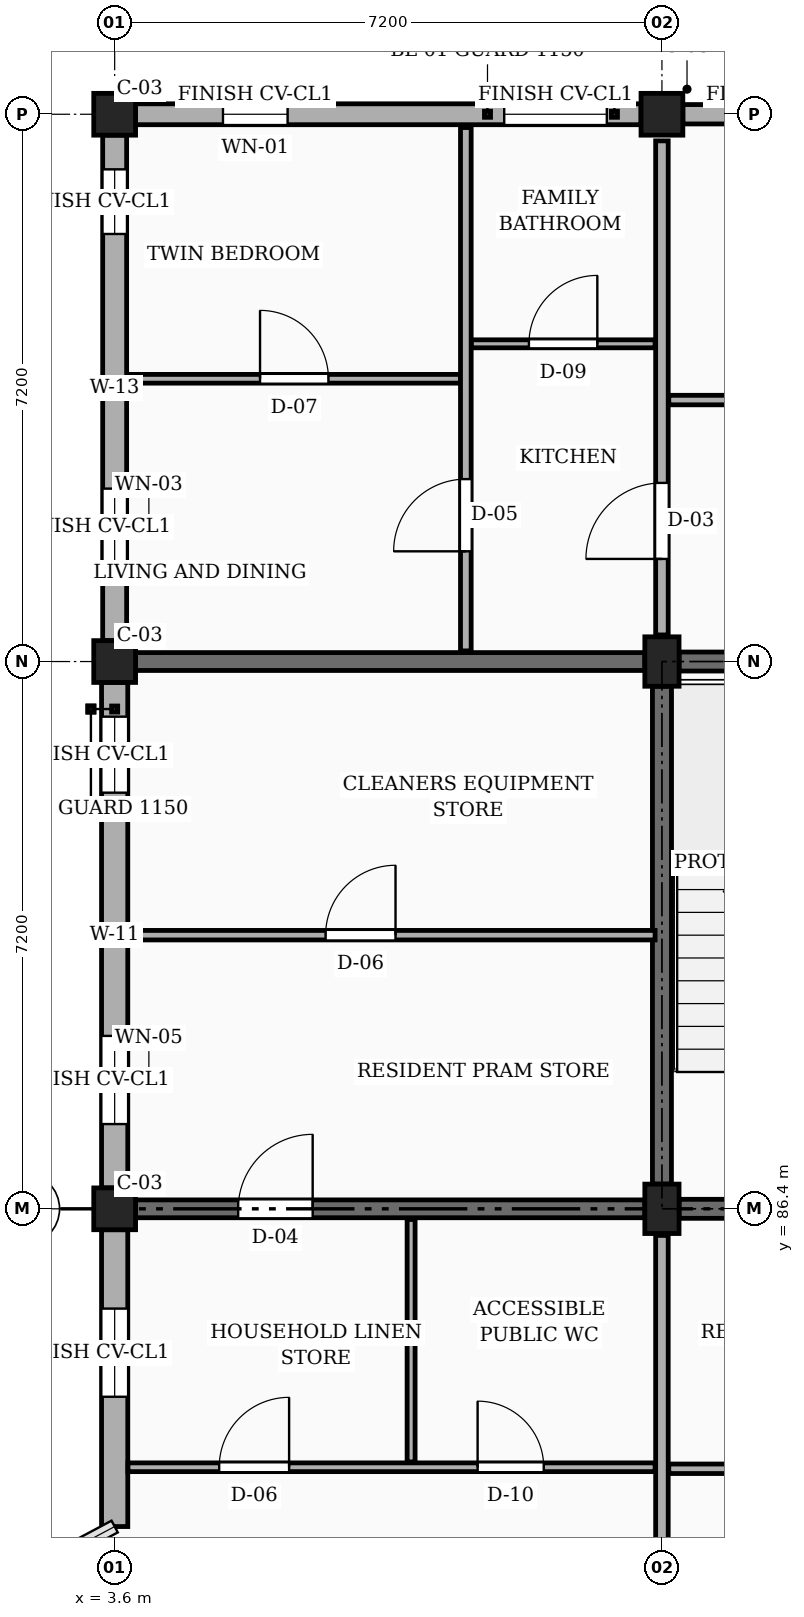
"""IFC4 building model, lengths in metres.
Left out: names, types, materials, properties, quantities, classifications, styles, units other than length and angle.
Written with IfcOpenShell. Run it as: python <this file> out.ifc"""

import sys

from ifc_helpers import new_model, si_unit, direction, frame, frame_2d, origin, origin_2d, place, context, subcontext, project, spatial, rectangle, extrude, element, fill, save


model = new_model("IFC4")
c1 = context("Model", 3, precision=1e-05, world=origin(), true_north=direction((0.0, 1.0)))
c2 = subcontext(c1, "Body", "Model", "MODEL_VIEW")
j1 = project(units=[si_unit("LENGTHUNIT", "METRE"), si_unit("PLANEANGLEUNIT", "RADIAN")], contexts=[c1])
p1 = place(None, origin())
s1 = spatial("IfcSite", under=j1, at=p1, CompositionType="ELEMENT")
p2 = place(p1, origin())
s2 = spatial("IfcBuilding", under=s1, at=p2, CompositionType="ELEMENT")
p3 = place(p2, frame((0.0, 0.0, 13.95)))
s3 = spatial("IfcBuildingStorey", under=s2, at=p3, CompositionType="ELEMENT", Elevation=13.95)
for number, where, z_axis, x_axis in (
    (1, (3.6, 86.4, 0.0), (0.0, 0.0, 1.0), (1.0, 0.0, 0.0)),
    (2, (3.6, 93.6, 0.0), (0.0, 0.0, 1.0), (1.0, 0.0, 0.0)),
    (3, (3.6, 100.8, 0.0), (0.0, 0.0, 1.0), (1.0, 0.0, 0.0)),
):
    element("IfcColumn", number, at=place(p3, frame(where, z_axis=z_axis, x_axis=x_axis)), inside=s3, PredefinedType="COLUMN", context=c2, shape_type="SweptSolid", body=[
        extrude(rectangle(XDim=0.55, YDim=0.55, at=origin_2d()), origin(), (0.0, 0.0, 1.0), 3.15),
    ])
for number, where, z_axis, x_axis in (
    (4, (10.8, 86.4, 0.0), (0.0, 0.0, 1.0), (1.0, 0.0, 0.0)),
    (5, (10.8, 93.6, 0.0), (0.0, 0.0, 1.0), (1.0, 0.0, 0.0)),
):
    element("IfcColumn", number, at=place(p3, frame(where, z_axis=z_axis, x_axis=x_axis)), inside=s3, PredefinedType="COLUMN", context=c2, shape_type="SweptSolid", body=[
        extrude(rectangle(XDim=0.45, YDim=0.65, at=origin_2d()), origin(), (0.0, 0.0, 1.0), 3.15),
    ])
p4 = place(p3, frame((10.8, 100.8, 0.0), z_axis=(0.0, 0.0, 1.0), x_axis=(1.0, 0.0, 0.0)))
e6 = element("IfcColumn", 6, at=p4, inside=s3, PredefinedType="COLUMN", context=c2, shape_type="SweptSolid", body=[
    extrude(rectangle(XDim=0.55, YDim=0.55, at=origin_2d()), origin(), (0.0, 0.0, 1.0), 3.15),
])
p5 = place(p3, frame((3.875, 86.4, 0.0), z_axis=(0.0, 0.0, 1.0), x_axis=(1.0, 0.0, 0.0)))
e7 = element("IfcWall", 7, at=p5, inside=s3, PredefinedType="SOLIDWALL", context=c2, shape_type="SweptSolid", body=[
    extrude(rectangle(XDim=6.7, YDim=0.235, at=frame_2d((3.35, 0.0))), origin(), (0.0, 0.0, 1.0), 2.21),
])
p6 = place(p5, frame((1.35, 0.0, 0.0)))
e8 = element("IfcOpeningElement", 8, at=p6, cuts=e7, PredefinedType="OPENING", context=c2, shape_type="SweptSolid", body=[
    extrude(rectangle(XDim=0.98, YDim=2.12, at=frame_2d((0.49, 1.06))), frame((0.0, 0.127, 0.0), z_axis=(0.0, -1.0, 0.0), x_axis=(1.0, 0.0, 0.0)), (0.0, 0.0, 1.0), 0.255),
])
p7 = place(p3, frame((3.875, 93.6, 0.0), z_axis=(0.0, 0.0, 1.0), x_axis=(1.0, 0.0, 0.0)))
e9 = element("IfcWall", 9, at=p7, inside=s3, PredefinedType="SOLIDWALL", context=c2, shape_type="SweptSolid", body=[
    extrude(rectangle(XDim=6.7, YDim=0.235, at=frame_2d((3.35, 0.0))), origin(), (0.0, 0.0, 1.0), 2.21),
])
p8 = place(p3, frame((17.725, 100.8, 0.0), z_axis=(0.0, 0.0, 1.0), x_axis=(-1.0, 0.0, 0.0)))
e10 = element("IfcWall", 10, at=p8, inside=s3, PredefinedType="SOLIDWALL", context=c2, shape_type="SweptSolid", body=[
    extrude(rectangle(XDim=6.65, YDim=0.255, at=frame_2d((3.325, 0.0))), origin(), (0.0, 0.0, 1.0), 2.48),
])
p9 = place(p8, frame((0.45, 0.0, 0.78)))
e11 = element("IfcOpeningElement", 11, at=p9, cuts=e10, PredefinedType="OPENING", context=c2, shape_type="SweptSolid", body=[
    extrude(rectangle(XDim=1.15, YDim=1.44, at=frame_2d((0.575, 0.72))), frame((0.0, 0.137, 0.0), z_axis=(0.0, -1.0, 0.0), x_axis=(1.0, 0.0, 0.0)), (0.0, 0.0, 1.0), 0.275),
])
p10 = place(p8, frame((4.65, 0.0, 0.78)))
e12 = element("IfcOpeningElement", 12, at=p10, cuts=e10, PredefinedType="OPENING", context=c2, shape_type="SweptSolid", body=[
    extrude(rectangle(XDim=1.35, YDim=1.44, at=frame_2d((0.675, 0.72))), frame((0.0, 0.137, 0.0), z_axis=(0.0, -1.0, 0.0), x_axis=(1.0, 0.0, 0.0)), (0.0, 0.0, 1.0), 0.275),
])
p11 = place(p3, frame((10.525, 100.8, 0.0), z_axis=(0.0, 0.0, 1.0), x_axis=(-1.0, 0.0, 0.0)))
e13 = element("IfcWall", 13, at=p11, inside=s3, PredefinedType="SOLIDWALL", context=c2, shape_type="SweptSolid", body=[
    extrude(rectangle(XDim=6.65, YDim=0.275, at=frame_2d((3.325, 0.0))), origin(), (0.0, 0.0, 1.0), 2.48),
])
p12 = place(p11, frame((0.45, 0.0, 0.78)))
e14 = element("IfcOpeningElement", 14, at=p12, cuts=e13, PredefinedType="OPENING", context=c2, shape_type="SweptSolid", body=[
    extrude(rectangle(XDim=1.35, YDim=1.44, at=frame_2d((0.675, 0.72))), frame((0.0, 0.147, 0.0), z_axis=(0.0, -1.0, 0.0), x_axis=(1.0, 0.0, 0.0)), (0.0, 0.0, 1.0), 0.295),
])
p13 = place(p11, frame((4.65, 0.0, 0.78)))
e15 = element("IfcOpeningElement", 15, at=p13, cuts=e13, PredefinedType="OPENING", context=c2, shape_type="SweptSolid", body=[
    extrude(rectangle(XDim=0.85, YDim=1.15, at=frame_2d((0.425, 0.575))), frame((0.0, 0.147, 0.0), z_axis=(0.0, -1.0, 0.0), x_axis=(1.0, 0.0, 0.0)), (0.0, 0.0, 1.0), 0.295),
])
p14 = place(p3, frame((3.6, 100.525, 0.0), z_axis=(0.0, 0.0, 1.0), x_axis=(0.0, -1.0, 0.0)))
e16 = element("IfcWall", 16, at=p14, inside=s3, PredefinedType="SOLIDWALL", context=c2, shape_type="SweptSolid", body=[
    extrude(rectangle(XDim=6.65, YDim=0.315, at=frame_2d((3.325, 0.0))), origin(), (0.0, 0.0, 1.0), 2.48),
])
p15 = place(p14, frame((0.45, 0.0, 0.78)))
e17 = element("IfcOpeningElement", 17, at=p15, cuts=e16, PredefinedType="OPENING", context=c2, shape_type="SweptSolid", body=[
    extrude(rectangle(XDim=0.85, YDim=1.15, at=frame_2d((0.425, 0.575))), frame((0.0, 0.167, 0.0), z_axis=(0.0, -1.0, 0.0), x_axis=(1.0, 0.0, 0.0)), (0.0, 0.0, 1.0), 0.335),
])
p16 = place(p14, frame((4.65, 0.0, 0.78)))
e18 = element("IfcOpeningElement", 18, at=p16, cuts=e16, PredefinedType="OPENING", context=c2, shape_type="SweptSolid", body=[
    extrude(rectangle(XDim=1.0, YDim=1.15, at=frame_2d((0.5, 0.575))), frame((0.0, 0.167, 0.0), z_axis=(0.0, -1.0, 0.0), x_axis=(1.0, 0.0, 0.0)), (0.0, 0.0, 1.0), 0.335),
])
p17 = place(p3, frame((3.6, 93.325, 0.0), z_axis=(0.0, 0.0, 1.0), x_axis=(0.0, -1.0, 0.0)))
e19 = element("IfcWall", 19, at=p17, inside=s3, PredefinedType="SOLIDWALL", context=c2, shape_type="SweptSolid", body=[
    extrude(rectangle(XDim=6.65, YDim=0.345, at=frame_2d((3.325, 0.0))), origin(), (0.0, 0.0, 1.0), 2.48),
])
p18 = place(p17, frame((0.45, 0.0, 0.78)))
e20 = element("IfcOpeningElement", 20, at=p18, cuts=e19, PredefinedType="OPENING", context=c2, shape_type="SweptSolid", body=[
    extrude(rectangle(XDim=1.0, YDim=1.15, at=frame_2d((0.5, 0.575))), frame((0.0, 0.183, 0.0), z_axis=(0.0, -1.0, 0.0), x_axis=(1.0, 0.0, 0.0)), (0.0, 0.0, 1.0), 0.365),
])
p19 = place(p17, frame((4.65, 0.0, 0.78)))
e21 = element("IfcOpeningElement", 21, at=p19, cuts=e19, PredefinedType="OPENING", context=c2, shape_type="SweptSolid", body=[
    extrude(rectangle(XDim=1.16, YDim=1.15, at=frame_2d((0.58, 0.575))), frame((0.0, 0.183, 0.0), z_axis=(0.0, -1.0, 0.0), x_axis=(1.0, 0.0, 0.0)), (0.0, 0.0, 1.0), 0.365),
])
p20 = place(p3, frame((3.6, 86.125, 0.0), z_axis=(0.0, 0.0, 1.0), x_axis=(0.0, -1.0, 0.0)))
e22 = element("IfcWall", 22, at=p20, inside=s3, PredefinedType="SOLIDWALL", context=c2, shape_type="SweptSolid", body=[
    extrude(rectangle(XDim=3.905, YDim=0.345, at=frame_2d((1.953, 0.0))), origin(), (0.0, 0.0, 1.0), 2.48),
])
p21 = place(p20, frame((1.038, 0.0, 0.78)))
e23 = element("IfcOpeningElement", 23, at=p21, cuts=e22, PredefinedType="OPENING", context=c2, shape_type="SweptSolid", body=[
    extrude(rectangle(XDim=1.16, YDim=1.15, at=frame_2d((0.58, 0.575))), frame((0.0, 0.183, 0.0), z_axis=(0.0, -1.0, 0.0), x_axis=(1.0, 0.0, 0.0)), (0.0, 0.0, 1.0), 0.365),
])
p22 = place(p3, frame((10.8, 86.725, 0.0), z_axis=(0.0, 0.0, 1.0), x_axis=(0.0, 1.0, 0.0)))
e24 = element("IfcWall", 24, at=p22, inside=s3, PredefinedType="SHEAR", context=c2, shape_type="SweptSolid", body=[
    extrude(rectangle(XDim=6.55, YDim=0.25, at=frame_2d((3.275, 0.0))), origin(), (0.0, 0.0, 1.0), 2.91),
])
for number, where, z_axis, x_axis in (
    (25, (11.025, 93.6, 0.0), (0.0, 0.0, 1.0), (1.0, 0.0, 0.0)),
    (26, (11.025, 86.4, 0.0), (0.0, 0.0, 1.0), (1.0, 0.0, 0.0)),
):
    element("IfcWall", number, at=place(p3, frame(where, z_axis=z_axis, x_axis=x_axis)), inside=s3, PredefinedType="SHEAR", context=c2, shape_type="SweptSolid", body=[
        extrude(rectangle(XDim=6.75, YDim=0.25, at=frame_2d((3.375, 0.0))), origin(), (0.0, 0.0, 1.0), 2.91),
    ])
p23 = place(p3, frame((10.8, 79.55, 0.0), z_axis=(0.0, 0.0, 1.0), x_axis=(0.0, 1.0, 0.0)))
e27 = element("IfcWall", 27, at=p23, inside=s3, PredefinedType="PARTITIONING", context=c2, shape_type="SweptSolid", body=[
    extrude(rectangle(XDim=6.5, YDim=0.165, at=frame_2d((3.25, 0.0))), origin(), (0.0, 0.0, 1.0), 2.345),
])
p24 = place(p23, frame((1.1, 0.0, 0.0)))
e28 = element("IfcOpeningElement", 28, at=p24, cuts=e27, PredefinedType="OPENING", context=c2, shape_type="SweptSolid", body=[
    extrude(rectangle(XDim=1.14, YDim=2.18, at=frame_2d((0.57, 1.09))), frame((0.0, 0.093, 0.0), z_axis=(0.0, -1.0, 0.0), x_axis=(1.0, 0.0, 0.0)), (0.0, 0.0, 1.0), 0.185),
])
p25 = place(p3, frame((10.8, 93.95, 0.0), z_axis=(0.0, 0.0, 1.0), x_axis=(0.0, 1.0, 0.0)))
e29 = element("IfcWall", 29, at=p25, inside=s3, PredefinedType="PARTITIONING", context=c2, shape_type="SweptSolid", body=[
    extrude(rectangle(XDim=6.5, YDim=0.165, at=frame_2d((3.25, 0.0))), origin(), (0.0, 0.0, 1.0), 2.345),
])
p26 = place(p25, frame((1.0, 0.0, 0.0)))
e30 = element("IfcOpeningElement", 30, at=p26, cuts=e29, PredefinedType="OPENING", context=c2, shape_type="SweptSolid", body=[
    extrude(rectangle(XDim=1.0, YDim=2.15, at=frame_2d((0.5, 1.075))), frame((0.0, 0.093, 0.0), z_axis=(0.0, -1.0, 0.0), x_axis=(1.0, 0.0, 0.0)), (0.0, 0.0, 1.0), 0.185),
])
p27 = place(p3, frame((10.89, 82.98, 0.0), z_axis=(0.0, 0.0, 1.0), x_axis=(1.0, 0.0, 0.0)))
e31 = element("IfcWall", 31, at=p27, inside=s3, PredefinedType="PARTITIONING", context=c2, shape_type="SweptSolid", body=[
    extrude(rectangle(XDim=7.02, YDim=0.125, at=frame_2d((3.51, 0.0))), origin(), (0.0, 0.0, 1.0), 2.345),
])
p28 = place(p27, frame((2.85, 0.0, 0.0)))
e32 = element("IfcOpeningElement", 32, at=p28, cuts=e31, PredefinedType="OPENING", context=c2, shape_type="SweptSolid", body=[
    extrude(rectangle(XDim=1.02, YDim=2.15, at=frame_2d((0.51, 1.075))), frame((0.0, 0.073, 0.0), z_axis=(0.0, -1.0, 0.0), x_axis=(1.0, 0.0, 0.0)), (0.0, 0.0, 1.0), 0.145),
])
p29 = place(p3, frame((3.775, 83.0, 0.0), z_axis=(0.0, 0.0, 1.0), x_axis=(1.0, 0.0, 0.0)))
e33 = element("IfcWall", 33, at=p29, inside=s3, PredefinedType="PARTITIONING", context=c2, shape_type="SweptSolid", body=[
    extrude(rectangle(XDim=6.935, YDim=0.115, at=frame_2d((3.468, 0.0))), origin(), (0.0, 0.0, 1.0), 2.345),
])
p30 = place(p29, frame((4.6, 0.0, 0.0)))
e34 = element("IfcOpeningElement", 34, at=p30, cuts=e33, PredefinedType="OPENING", context=c2, shape_type="SweptSolid", body=[
    extrude(rectangle(XDim=0.87, YDim=2.05, at=frame_2d((0.435, 1.025))), frame((0.0, 0.067, 0.0), z_axis=(0.0, -1.0, 0.0), x_axis=(1.0, 0.0, 0.0)), (0.0, 0.0, 1.0), 0.135),
])
p31 = place(p29, frame((1.2, 0.0, 0.0)))
e35 = element("IfcOpeningElement", 35, at=p31, cuts=e33, PredefinedType="OPENING", context=c2, shape_type="SweptSolid", body=[
    extrude(rectangle(XDim=0.92, YDim=2.1, at=frame_2d((0.46, 1.05))), frame((0.0, 0.067, 0.0), z_axis=(0.0, -1.0, 0.0), x_axis=(1.0, 0.0, 0.0)), (0.0, 0.0, 1.0), 0.135),
])
p32 = place(p3, frame((7.5, 83.07, 0.0), z_axis=(0.0, 0.0, 1.0), x_axis=(0.0, 1.0, 0.0)))
e36 = element("IfcWall", 36, at=p32, inside=s3, PredefinedType="PARTITIONING", context=c2, shape_type="SweptSolid", body=[
    extrude(rectangle(XDim=3.19, YDim=0.105, at=frame_2d((1.595, 0.0))), origin(), (0.0, 0.0, 1.0), 2.345),
])
p33 = place(p3, frame((3.775, 90.0, 0.0), z_axis=(0.0, 0.0, 1.0), x_axis=(1.0, 0.0, 0.0)))
e37 = element("IfcWall", 37, at=p33, inside=s3, PredefinedType="PARTITIONING", context=c2, shape_type="SweptSolid", body=[
    extrude(rectangle(XDim=6.935, YDim=0.125, at=frame_2d((3.468, 0.0))), origin(), (0.0, 0.0, 1.0), 2.345),
])
p34 = place(p33, frame((2.6, 0.0, 0.0)))
e38 = element("IfcOpeningElement", 38, at=p34, cuts=e37, PredefinedType="OPENING", context=c2, shape_type="SweptSolid", body=[
    extrude(rectangle(XDim=0.92, YDim=2.1, at=frame_2d((0.46, 1.05))), frame((0.0, 0.073, 0.0), z_axis=(0.0, -1.0, 0.0), x_axis=(1.0, 0.0, 0.0)), (0.0, 0.0, 1.0), 0.145),
])
p35 = place(p3, frame((10.89, 97.04, 0.0), z_axis=(0.0, 0.0, 1.0), x_axis=(1.0, 0.0, 0.0)))
e39 = element("IfcWall", 39, at=p35, inside=s3, PredefinedType="PARTITIONING", context=c2, shape_type="SweptSolid", body=[
    extrude(rectangle(XDim=7.02, YDim=0.125, at=frame_2d((3.51, 0.0))), origin(), (0.0, 0.0, 1.0), 2.345),
])
p36 = place(p35, frame((2.85, 0.0, 0.0)))
e40 = element("IfcOpeningElement", 40, at=p36, cuts=e39, PredefinedType="OPENING", context=c2, shape_type="SweptSolid", body=[
    extrude(rectangle(XDim=1.02, YDim=2.15, at=frame_2d((0.51, 1.075))), frame((0.0, 0.073, 0.0), z_axis=(0.0, -1.0, 0.0), x_axis=(1.0, 0.0, 0.0)), (0.0, 0.0, 1.0), 0.145),
])
p37 = place(p3, frame((3.775, 97.32, 0.0), z_axis=(0.0, 0.0, 1.0), x_axis=(1.0, 0.0, 0.0)))
e41 = element("IfcWall", 41, at=p37, inside=s3, PredefinedType="PARTITIONING", context=c2, shape_type="SweptSolid", body=[
    extrude(rectangle(XDim=4.375, YDim=0.115, at=frame_2d((2.188, 0.0))), origin(), (0.0, 0.0, 1.0), 2.345),
])
p38 = place(p37, frame((1.738, 0.0, 0.0)))
e42 = element("IfcOpeningElement", 42, at=p38, cuts=e41, PredefinedType="OPENING", context=c2, shape_type="SweptSolid", body=[
    extrude(rectangle(XDim=0.9, YDim=2.1, at=frame_2d((0.45, 1.05))), frame((0.0, 0.067, 0.0), z_axis=(0.0, -1.0, 0.0), x_axis=(1.0, 0.0, 0.0)), (0.0, 0.0, 1.0), 0.135),
])
p39 = place(p3, frame((8.29, 97.78, 0.0), z_axis=(0.0, 0.0, 1.0), x_axis=(1.0, 0.0, 0.0)))
e43 = element("IfcWall", 43, at=p39, inside=s3, PredefinedType="PARTITIONING", context=c2, shape_type="SweptSolid", body=[
    extrude(rectangle(XDim=2.42, YDim=0.105, at=frame_2d((1.21, 0.0))), origin(), (0.0, 0.0, 1.0), 2.345),
])
p40 = place(p39, frame((0.76, 0.0, 0.0)))
e44 = element("IfcOpeningElement", 44, at=p40, cuts=e43, PredefinedType="OPENING", context=c2, shape_type="SweptSolid", body=[
    extrude(rectangle(XDim=0.9, YDim=2.05, at=frame_2d((0.45, 1.025))), frame((0.0, 0.062, 0.0), z_axis=(0.0, -1.0, 0.0), x_axis=(1.0, 0.0, 0.0)), (0.0, 0.0, 1.0), 0.125),
])
p41 = place(p3, frame((8.22, 93.74, 0.0), z_axis=(0.0, 0.0, 1.0), x_axis=(0.0, 1.0, 0.0)))
e45 = element("IfcWall", 45, at=p41, inside=s3, PredefinedType="PARTITIONING", context=c2, shape_type="SweptSolid", body=[
    extrude(rectangle(XDim=6.885, YDim=0.14, at=frame_2d((3.442, 0.0))), origin(), (0.0, 0.0, 1.0), 2.345),
])
p42 = place(p41, frame((1.31, 0.0, 0.0)))
e46 = element("IfcOpeningElement", 46, at=p42, cuts=e45, PredefinedType="OPENING", context=c2, shape_type="SweptSolid", body=[
    extrude(rectangle(XDim=0.95, YDim=2.1, at=frame_2d((0.475, 1.05))), frame((0.0, 0.08, 0.0), z_axis=(0.0, -1.0, 0.0), x_axis=(1.0, 0.0, 0.0)), (0.0, 0.0, 1.0), 0.16),
])
p43 = place(p12, origin())
e47 = element("IfcWindow", 47, at=p43, inside=s3, PartitioningType="SINGLE_PANEL", PredefinedType="WINDOW", context=c2, shape_type="SweptSolid", body=[
    extrude(rectangle(XDim=1.35, YDim=1.44, at=frame_2d((0.675, 0.72))), frame((0.0, 0.03, 0.0), z_axis=(0.0, -1.0, 0.0), x_axis=(1.0, 0.0, 0.0)), (0.0, 0.0, 1.0), 0.06),
])
fill(e14, e47)
p44 = place(p13, origin())
e48 = element("IfcWindow", 48, at=p44, inside=s3, PartitioningType="SINGLE_PANEL", PredefinedType="WINDOW", context=c2, shape_type="SweptSolid", body=[
    extrude(rectangle(XDim=0.85, YDim=1.15, at=frame_2d((0.425, 0.575))), frame((0.0, 0.03, 0.0), z_axis=(0.0, -1.0, 0.0), x_axis=(1.0, 0.0, 0.0)), (0.0, 0.0, 1.0), 0.06),
])
fill(e15, e48)
p45 = place(p15, origin())
e49 = element("IfcWindow", 49, at=p45, inside=s3, PartitioningType="SINGLE_PANEL", PredefinedType="WINDOW", context=c2, shape_type="SweptSolid", body=[
    extrude(rectangle(XDim=0.85, YDim=1.15, at=frame_2d((0.425, 0.575))), frame((0.0, 0.03, 0.0), z_axis=(0.0, -1.0, 0.0), x_axis=(1.0, 0.0, 0.0)), (0.0, 0.0, 1.0), 0.06),
])
fill(e17, e49)
p46 = place(p16, origin())
e50 = element("IfcWindow", 50, at=p46, inside=s3, PartitioningType="SINGLE_PANEL", PredefinedType="WINDOW", context=c2, shape_type="SweptSolid", body=[
    extrude(rectangle(XDim=1.0, YDim=1.15, at=frame_2d((0.5, 0.575))), frame((0.0, 0.03, 0.0), z_axis=(0.0, -1.0, 0.0), x_axis=(1.0, 0.0, 0.0)), (0.0, 0.0, 1.0), 0.06),
])
fill(e18, e50)
p47 = place(p18, origin())
e51 = element("IfcWindow", 51, at=p47, inside=s3, PartitioningType="SINGLE_PANEL", PredefinedType="WINDOW", context=c2, shape_type="SweptSolid", body=[
    extrude(rectangle(XDim=1.0, YDim=1.15, at=frame_2d((0.5, 0.575))), frame((0.0, 0.03, 0.0), z_axis=(0.0, -1.0, 0.0), x_axis=(1.0, 0.0, 0.0)), (0.0, 0.0, 1.0), 0.06),
])
fill(e20, e51)
p48 = place(p19, origin())
e52 = element("IfcWindow", 52, at=p48, inside=s3, PartitioningType="SINGLE_PANEL", PredefinedType="WINDOW", context=c2, shape_type="SweptSolid", body=[
    extrude(rectangle(XDim=1.16, YDim=1.15, at=frame_2d((0.58, 0.575))), frame((0.0, 0.03, 0.0), z_axis=(0.0, -1.0, 0.0), x_axis=(1.0, 0.0, 0.0)), (0.0, 0.0, 1.0), 0.06),
])
fill(e21, e52)
p49 = place(p21, origin())
e53 = element("IfcWindow", 53, at=p49, inside=s3, PartitioningType="SINGLE_PANEL", PredefinedType="WINDOW", context=c2, shape_type="SweptSolid", body=[
    extrude(rectangle(XDim=1.16, YDim=1.15, at=frame_2d((0.58, 0.575))), frame((0.0, 0.03, 0.0), z_axis=(0.0, -1.0, 0.0), x_axis=(1.0, 0.0, 0.0)), (0.0, 0.0, 1.0), 0.06),
])
fill(e23, e53)
p50 = place(p26, origin())
e54 = element("IfcDoor", 54, at=p50, inside=s3, OperationType="SINGLE_SWING_LEFT", PredefinedType="DOOR", context=c2, shape_type="SweptSolid", body=[
    extrude(rectangle(XDim=1.0, YDim=2.15, at=frame_2d((0.5, 1.075))), frame((0.0, 0.025, 0.0), z_axis=(0.0, -1.0, 0.0), x_axis=(1.0, 0.0, 0.0)), (0.0, 0.0, 1.0), 0.05),
])
fill(e30, e54)
p51 = place(p30, origin())
e55 = element("IfcDoor", 55, at=p51, inside=s3, OperationType="SINGLE_SWING_LEFT", PredefinedType="DOOR", context=c2, shape_type="SweptSolid", body=[
    extrude(rectangle(XDim=0.87, YDim=2.05, at=frame_2d((0.435, 1.025))), frame((0.0, 0.025, 0.0), z_axis=(0.0, -1.0, 0.0), x_axis=(1.0, 0.0, 0.0)), (0.0, 0.0, 1.0), 0.05),
])
fill(e34, e55)
p52 = place(p31, origin())
e56 = element("IfcDoor", 56, at=p52, inside=s3, OperationType="SINGLE_SWING_RIGHT", PredefinedType="DOOR", context=c2, shape_type="SweptSolid", body=[
    extrude(rectangle(XDim=0.92, YDim=2.1, at=frame_2d((0.46, 1.05))), frame((0.0, 0.025, 0.0), z_axis=(0.0, -1.0, 0.0), x_axis=(1.0, 0.0, 0.0)), (0.0, 0.0, 1.0), 0.05),
])
fill(e35, e56)
p53 = place(p34, origin())
e57 = element("IfcDoor", 57, at=p53, inside=s3, OperationType="SINGLE_SWING_RIGHT", PredefinedType="DOOR", context=c2, shape_type="SweptSolid", body=[
    extrude(rectangle(XDim=0.92, YDim=2.1, at=frame_2d((0.46, 1.05))), frame((0.0, 0.025, 0.0), z_axis=(0.0, -1.0, 0.0), x_axis=(1.0, 0.0, 0.0)), (0.0, 0.0, 1.0), 0.05),
])
fill(e38, e57)
p54 = place(p38, origin())
e58 = element("IfcDoor", 58, at=p54, inside=s3, OperationType="SINGLE_SWING_LEFT", PredefinedType="DOOR", context=c2, shape_type="SweptSolid", body=[
    extrude(rectangle(XDim=0.9, YDim=2.1, at=frame_2d((0.45, 1.05))), frame((0.0, 0.025, 0.0), z_axis=(0.0, -1.0, 0.0), x_axis=(1.0, 0.0, 0.0)), (0.0, 0.0, 1.0), 0.05),
])
fill(e42, e58)
p55 = place(p40, origin())
e59 = element("IfcDoor", 59, at=p55, inside=s3, OperationType="SINGLE_SWING_RIGHT", PredefinedType="DOOR", context=c2, shape_type="SweptSolid", body=[
    extrude(rectangle(XDim=0.9, YDim=2.05, at=frame_2d((0.45, 1.025))), frame((0.0, 0.025, 0.0), z_axis=(0.0, -1.0, 0.0), x_axis=(1.0, 0.0, 0.0)), (0.0, 0.0, 1.0), 0.05),
])
fill(e44, e59)
p56 = place(p42, origin())
e60 = element("IfcDoor", 60, at=p56, inside=s3, OperationType="SINGLE_SWING_LEFT", PredefinedType="DOOR", context=c2, shape_type="SweptSolid", body=[
    extrude(rectangle(XDim=0.95, YDim=2.1, at=frame_2d((0.475, 1.05))), frame((0.0, 0.025, 0.0), z_axis=(0.0, -1.0, 0.0), x_axis=(1.0, 0.0, 0.0)), (0.0, 0.0, 1.0), 0.05),
])
fill(e46, e60)
p57 = place(p6, origin())
e61 = element("IfcDoor", 61, at=p57, inside=s3, OperationType="SINGLE_SWING_RIGHT", PredefinedType="DOOR", context=c2, shape_type="SweptSolid", body=[
    extrude(rectangle(XDim=0.98, YDim=2.12, at=frame_2d((0.49, 1.06))), frame((0.0, 0.025, 0.0), z_axis=(0.0, -1.0, 0.0), x_axis=(1.0, 0.0, 0.0)), (0.0, 0.0, 1.0), 0.05),
])
fill(e8, e61)
save(model, sys.argv[1])
